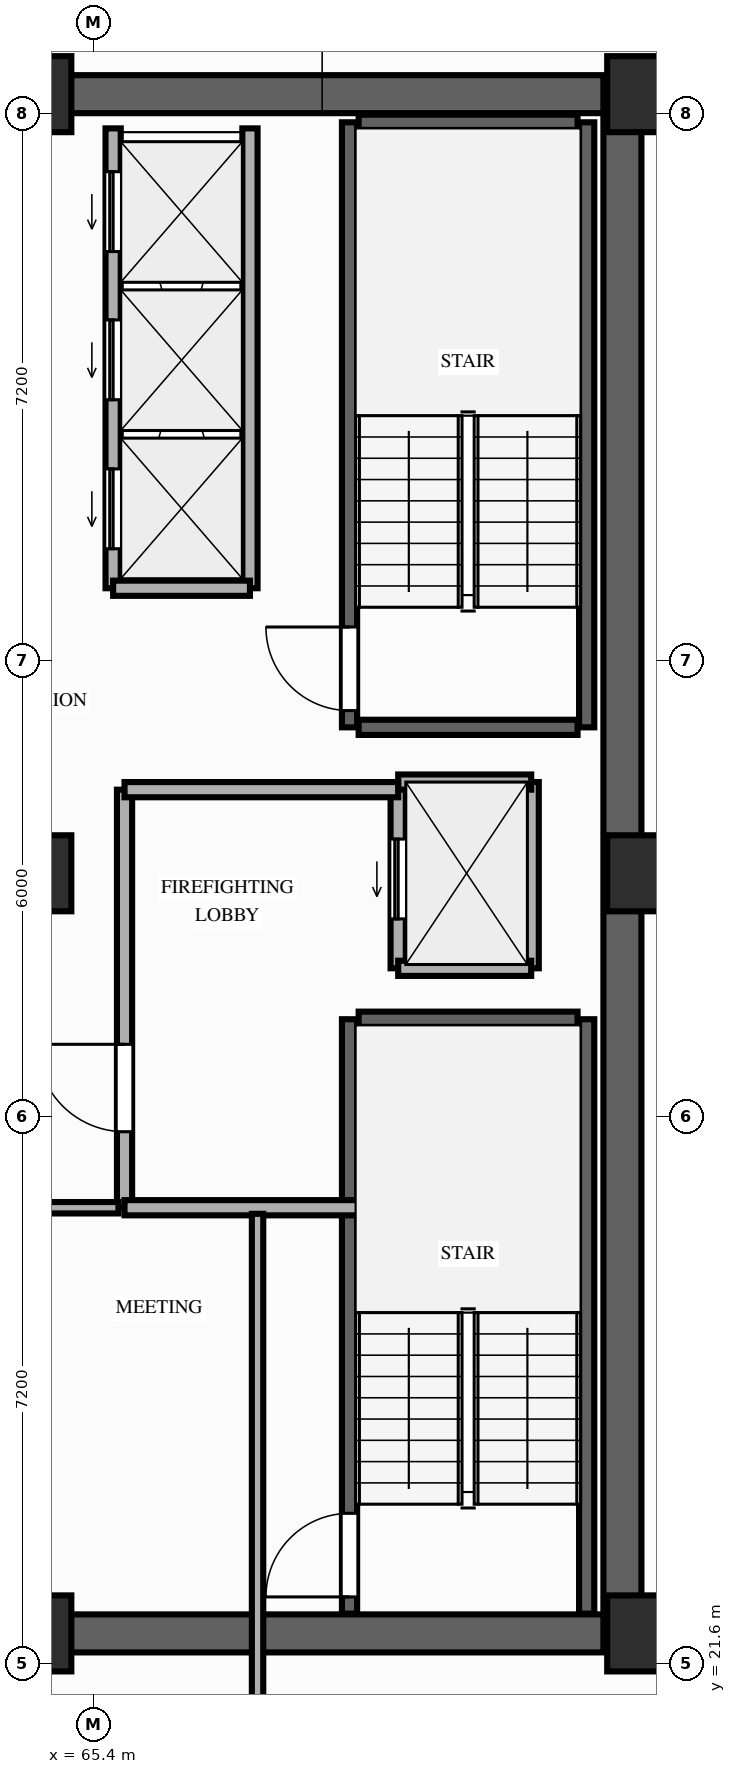
"""IFC4 building model, lengths in metres.
Left out: names, types, materials, properties, quantities, classifications, styles, units other than length and angle.
Written with IfcOpenShell. Run it as: python <this file> out.ifc"""

import sys

from ifc_helpers import new_model, si_unit, direction, frame, frame_2d, origin, origin_2d, place, context, subcontext, project, spatial, rectangle, extrude, element, fill, save


model = new_model("IFC4")
c1 = context("Model", 3, precision=1e-05, world=origin(), true_north=direction((0.0, 1.0)))
c2 = subcontext(c1, "Body", "Model", "MODEL_VIEW")
j1 = project(units=[si_unit("LENGTHUNIT", "METRE"), si_unit("PLANEANGLEUNIT", "RADIAN")], contexts=[c1])
p1 = place(None, origin())
s1 = spatial("IfcSite", under=j1, at=p1, CompositionType="ELEMENT")
p2 = place(p1, origin())
s2 = spatial("IfcBuilding", under=s1, at=p2, CompositionType="ELEMENT")
p3 = place(p2, frame((0.0, 0.0, 50.0)))
s3 = spatial("IfcBuildingStorey", under=s2, at=p3, CompositionType="ELEMENT", Elevation=50.0)
for number, where, z_axis, x_axis in (
    (1, (64.6, 22.0, 0.0), (0.0, 0.0, 1.0), (1.0, 0.0, 0.0)),
    (2, (72.65, 22.0, 0.0), (0.0, 0.0, 1.0), (1.0, 0.0, 0.0)),
    (3, (64.6, 32.0, 0.0), (0.0, 0.0, 1.0), (1.0, 0.0, 0.0)),
    (4, (72.65, 32.0, 0.0), (0.0, 0.0, 1.0), (1.0, 0.0, 0.0)),
    (5, (64.6, 42.25, 0.0), (0.0, 0.0, 1.0), (1.0, 0.0, 0.0)),
    (6, (72.65, 42.25, 0.0), (0.0, 0.0, 1.0), (1.0, 0.0, 0.0)),
):
    element("IfcColumn", number, at=place(p3, frame(where, z_axis=z_axis, x_axis=x_axis)), inside=s3, PredefinedType="COLUMN", context=c2, shape_type="SweptSolid", body=[
        extrude(rectangle(XDim=1.0, YDim=1.0, at=origin_2d()), origin(), (0.0, 0.0, 1.0), 3.2),
    ])
p4 = place(p3, frame((72.35, 22.0, 0.0), z_axis=(0.0, 0.0, 1.0), x_axis=(0.0, 1.0, 0.0)))
e7 = element("IfcWall", 7, at=p4, inside=s3, PredefinedType="SHEAR", context=c2, shape_type="SweptSolid", body=[
    extrude(rectangle(XDim=20.25, YDim=0.5, at=frame_2d((10.125, 0.0))), origin(), (0.0, 0.0, 1.0), 3.02),
])
for number, where, z_axis, x_axis in (
    (8, (64.6, 42.25, 0.0), (0.0, 0.0, 1.0), (1.0, 0.0, 0.0)),
    (9, (64.6, 22.0, 0.0), (0.0, 0.0, 1.0), (1.0, 0.0, 0.0)),
):
    element("IfcWall", number, at=place(p3, frame(where, z_axis=z_axis, x_axis=x_axis)), inside=s3, PredefinedType="SHEAR", context=c2, shape_type="SweptSolid", body=[
        extrude(rectangle(XDim=7.5, YDim=0.5, at=frame_2d((3.75, 0.0))), origin(), (0.0, 0.0, 1.0), 3.02),
    ])
p5 = place(p3, frame((68.76, 22.26, 0.0), z_axis=(0.0, 0.0, 1.0), x_axis=(0.0, 1.0, 0.0)))
e10 = element("IfcWall", 10, at=p5, inside=s3, PredefinedType="SHEAR", context=c2, shape_type="SweptSolid", body=[
    extrude(rectangle(XDim=7.82, YDim=0.2, at=frame_2d((3.91, 0.0))), origin(), (0.0, 0.0, 1.0), 3.02),
])
p6 = place(p5, frame((0.22, 0.0, 0.0)))
e11 = element("IfcOpeningElement", 11, at=p6, cuts=e10, PredefinedType="OPENING", context=c2, shape_type="SweptSolid", body=[
    extrude(rectangle(XDim=1.1, YDim=2.15, at=frame_2d((0.55, 1.075))), frame((0.0, 0.11, 0.0), z_axis=(0.0, -1.0, 0.0), x_axis=(1.0, 0.0, 0.0)), (0.0, 0.0, 1.0), 0.22),
])
p7 = place(p3, frame((71.88, 22.26, 0.0), z_axis=(0.0, 0.0, 1.0), x_axis=(0.0, 1.0, 0.0)))
e12 = element("IfcWall", 12, at=p7, inside=s3, PredefinedType="SHEAR", context=c2, shape_type="SweptSolid", body=[
    extrude(rectangle(XDim=7.82, YDim=0.2, at=frame_2d((3.91, 0.0))), origin(), (0.0, 0.0, 1.0), 3.02),
])
p8 = place(p3, frame((68.88, 30.08, 0.0), z_axis=(0.0, 0.0, 1.0), x_axis=(1.0, 0.0, 0.0)))
e13 = element("IfcWall", 13, at=p8, inside=s3, PredefinedType="SHEAR", context=c2, shape_type="SweptSolid", body=[
    extrude(rectangle(XDim=2.88, YDim=0.2, at=frame_2d((1.44, 0.0))), origin(), (0.0, 0.0, 1.0), 3.02),
])
p9 = place(p3, frame((68.76, 33.92, 0.0), z_axis=(0.0, 0.0, 1.0), x_axis=(0.0, 1.0, 0.0)))
e14 = element("IfcWall", 14, at=p9, inside=s3, PredefinedType="SHEAR", context=c2, shape_type="SweptSolid", body=[
    extrude(rectangle(XDim=7.96, YDim=0.2, at=frame_2d((3.98, 0.0))), origin(), (0.0, 0.0, 1.0), 3.02),
])
p10 = place(p9, frame((0.22, 0.0, 0.0)))
e15 = element("IfcOpeningElement", 15, at=p10, cuts=e14, PredefinedType="OPENING", context=c2, shape_type="SweptSolid", body=[
    extrude(rectangle(XDim=1.1, YDim=2.15, at=frame_2d((0.55, 1.075))), frame((0.0, 0.11, 0.0), z_axis=(0.0, -1.0, 0.0), x_axis=(1.0, 0.0, 0.0)), (0.0, 0.0, 1.0), 0.22),
])
p11 = place(p3, frame((71.88, 33.92, 0.0), z_axis=(0.0, 0.0, 1.0), x_axis=(0.0, 1.0, 0.0)))
e16 = element("IfcWall", 16, at=p11, inside=s3, PredefinedType="SHEAR", context=c2, shape_type="SweptSolid", body=[
    extrude(rectangle(XDim=7.96, YDim=0.2, at=frame_2d((3.98, 0.0))), origin(), (0.0, 0.0, 1.0), 3.02),
])
for number, where, z_axis, x_axis in (
    (17, (68.88, 41.88, 0.0), (0.0, 0.0, 1.0), (1.0, 0.0, 0.0)),
    (18, (68.88, 33.92, 0.0), (0.0, 0.0, 1.0), (1.0, 0.0, 0.0)),
):
    element("IfcWall", number, at=place(p3, frame(where, z_axis=z_axis, x_axis=x_axis)), inside=s3, PredefinedType="SHEAR", context=c2, shape_type="SweptSolid", body=[
        extrude(rectangle(XDim=2.88, YDim=0.2, at=frame_2d((1.44, 0.0))), origin(), (0.0, 0.0, 1.0), 3.02),
    ])
p12 = place(p3, frame((65.65, 35.75, 0.0), z_axis=(0.0, 0.0, 1.0), x_axis=(0.0, 1.0, 0.0)))
e19 = element("IfcWall", 19, at=p12, inside=s3, PredefinedType="MOVABLE", context=c2, shape_type="SweptSolid", body=[
    extrude(rectangle(XDim=6.05, YDim=0.2, at=frame_2d((3.025, 0.0))), origin(), (0.0, 0.0, 1.0), 3.02),
])
p13 = place(p12, frame((0.52, 0.0, 0.0)))
e20 = element("IfcOpeningElement", 20, at=p13, cuts=e19, PredefinedType="OPENING", context=c2, shape_type="SweptSolid", body=[
    extrude(rectangle(XDim=1.05, YDim=2.15, at=frame_2d((0.525, 1.075))), frame((0.0, 0.11, 0.0), z_axis=(0.0, -1.0, 0.0), x_axis=(1.0, 0.0, 0.0)), (0.0, 0.0, 1.0), 0.22),
])
p14 = place(p12, frame((2.48, 0.0, 0.0)))
e21 = element("IfcOpeningElement", 21, at=p14, cuts=e19, PredefinedType="OPENING", context=c2, shape_type="SweptSolid", body=[
    extrude(rectangle(XDim=1.05, YDim=2.15, at=frame_2d((0.525, 1.075))), frame((0.0, 0.11, 0.0), z_axis=(0.0, -1.0, 0.0), x_axis=(1.0, 0.0, 0.0)), (0.0, 0.0, 1.0), 0.22),
])
p15 = place(p12, frame((4.43, 0.0, 0.0)))
e22 = element("IfcOpeningElement", 22, at=p15, cuts=e19, PredefinedType="OPENING", context=c2, shape_type="SweptSolid", body=[
    extrude(rectangle(XDim=1.05, YDim=2.15, at=frame_2d((0.525, 1.075))), frame((0.0, 0.11, 0.0), z_axis=(0.0, -1.0, 0.0), x_axis=(1.0, 0.0, 0.0)), (0.0, 0.0, 1.0), 0.22),
])
p16 = place(p3, frame((67.45, 35.75, 0.0), z_axis=(0.0, 0.0, 1.0), x_axis=(0.0, 1.0, 0.0)))
e23 = element("IfcWall", 23, at=p16, inside=s3, PredefinedType="MOVABLE", context=c2, shape_type="SweptSolid", body=[
    extrude(rectangle(XDim=6.05, YDim=0.2, at=frame_2d((3.025, 0.0))), origin(), (0.0, 0.0, 1.0), 3.02),
])
p17 = place(p3, frame((65.65, 35.75, 0.0), z_axis=(0.0, 0.0, 1.0), x_axis=(1.0, 0.0, 0.0)))
e24 = element("IfcWall", 24, at=p17, inside=s3, PredefinedType="MOVABLE", context=c2, shape_type="SweptSolid", body=[
    extrude(rectangle(XDim=1.8, YDim=0.2, at=frame_2d((0.9, 0.0))), origin(), (0.0, 0.0, 1.0), 3.02),
])
p18 = place(p3, frame((69.4, 30.75, 0.0), z_axis=(0.0, 0.0, 1.0), x_axis=(0.0, 1.0, 0.0)))
e25 = element("IfcWall", 25, at=p18, inside=s3, PredefinedType="MOVABLE", context=c2, shape_type="SweptSolid", body=[
    extrude(rectangle(XDim=2.45, YDim=0.2, at=frame_2d((1.225, 0.0))), origin(), (0.0, 0.0, 1.0), 3.02),
])
p19 = place(p18, frame((0.65, 0.0, 0.0)))
e26 = element("IfcOpeningElement", 26, at=p19, cuts=e25, PredefinedType="OPENING", context=c2, shape_type="SweptSolid", body=[
    extrude(rectangle(XDim=1.05, YDim=2.15, at=frame_2d((0.525, 1.075))), frame((0.0, 0.11, 0.0), z_axis=(0.0, -1.0, 0.0), x_axis=(1.0, 0.0, 0.0)), (0.0, 0.0, 1.0), 0.22),
])
p20 = place(p3, frame((71.15, 30.75, 0.0), z_axis=(0.0, 0.0, 1.0), x_axis=(0.0, 1.0, 0.0)))
e27 = element("IfcWall", 27, at=p20, inside=s3, PredefinedType="MOVABLE", context=c2, shape_type="SweptSolid", body=[
    extrude(rectangle(XDim=2.45, YDim=0.2, at=frame_2d((1.225, 0.0))), origin(), (0.0, 0.0, 1.0), 3.02),
])
for number, where, z_axis, x_axis in (
    (28, (69.4, 33.2, 0.0), (0.0, 0.0, 1.0), (1.0, 0.0, 0.0)),
    (29, (69.4, 30.75, 0.0), (0.0, 0.0, 1.0), (1.0, 0.0, 0.0)),
):
    element("IfcWall", number, at=place(p3, frame(where, z_axis=z_axis, x_axis=x_axis)), inside=s3, PredefinedType="MOVABLE", context=c2, shape_type="SweptSolid", body=[
        extrude(rectangle(XDim=1.75, YDim=0.2, at=frame_2d((0.875, 0.0))), origin(), (0.0, 0.0, 1.0), 3.02),
    ])
p21 = place(p3, frame((65.8, 27.6, 0.0), z_axis=(0.0, 0.0, 1.0), x_axis=(0.0, 1.0, 0.0)))
e30 = element("IfcWall", 30, at=p21, inside=s3, PredefinedType="PARTITIONING", context=c2, shape_type="SweptSolid", body=[
    extrude(rectangle(XDim=5.5, YDim=0.2, at=frame_2d((2.75, 0.0))), origin(), (0.0, 0.0, 1.0), 3.02),
])
p22 = place(p21, frame((1.0, 0.0, 0.0)))
e31 = element("IfcOpeningElement", 31, at=p22, cuts=e30, PredefinedType="OPENING", context=c2, shape_type="SweptSolid", body=[
    extrude(rectangle(XDim=1.15, YDim=2.15, at=frame_2d((0.575, 1.075))), frame((0.0, 0.11, 0.0), z_axis=(0.0, -1.0, 0.0), x_axis=(1.0, 0.0, 0.0)), (0.0, 0.0, 1.0), 0.22),
])
p23 = place(p3, frame((65.8, 33.1, 0.0), z_axis=(0.0, 0.0, 1.0), x_axis=(1.0, 0.0, 0.0)))
e32 = element("IfcWall", 32, at=p23, inside=s3, PredefinedType="PARTITIONING", context=c2, shape_type="SweptSolid", body=[
    extrude(rectangle(XDim=3.6, YDim=0.2, at=frame_2d((1.8, 0.0))), origin(), (0.0, 0.0, 1.0), 3.02),
])
p24 = place(p3, frame((65.8, 27.6, 0.0), z_axis=(0.0, 0.0, 1.0), x_axis=(1.0, 0.0, 0.0)))
e33 = element("IfcWall", 33, at=p24, inside=s3, PredefinedType="PARTITIONING", context=c2, shape_type="SweptSolid", body=[
    extrude(rectangle(XDim=3.4, YDim=0.2, at=frame_2d((1.7, 0.0))), origin(), (0.0, 0.0, 1.0), 3.02),
])
p25 = place(p3, frame((67.55, 21.05, 0.0), z_axis=(0.0, 0.0, 1.0), x_axis=(0.0, 1.0, 0.0)))
e34 = element("IfcWall", 34, at=p25, inside=s3, PredefinedType="PARTITIONING", context=c2, shape_type="SweptSolid", body=[
    extrude(rectangle(XDim=6.47, YDim=0.15, at=frame_2d((3.235, 0.0))), origin(), (0.0, 0.0, 1.0), 2.51),
])
p26 = place(p3, frame((64.25, 27.6, 0.0), z_axis=(0.0, 0.0, 1.0), x_axis=(1.0, 0.0, 0.0)))
e35 = element("IfcWall", 35, at=p26, inside=s3, PredefinedType="PARTITIONING", context=c2, shape_type="SweptSolid", body=[
    extrude(rectangle(XDim=1.47, YDim=0.15, at=frame_2d((0.735, 0.0))), origin(), (0.0, 0.0, 1.0), 2.51),
])
p27 = place(p6, origin())
e36 = element("IfcDoor", 36, at=p27, inside=s3, OperationType="SINGLE_SWING_LEFT", PredefinedType="DOOR", context=c2, shape_type="SweptSolid", body=[
    extrude(rectangle(XDim=1.1, YDim=2.15, at=frame_2d((0.55, 1.075))), frame((0.0, 0.025, 0.0), z_axis=(0.0, -1.0, 0.0), x_axis=(1.0, 0.0, 0.0)), (0.0, 0.0, 1.0), 0.05),
])
fill(e11, e36)
p28 = place(p10, origin())
e37 = element("IfcDoor", 37, at=p28, inside=s3, OperationType="SINGLE_SWING_RIGHT", PredefinedType="DOOR", context=c2, shape_type="SweptSolid", body=[
    extrude(rectangle(XDim=1.1, YDim=2.15, at=frame_2d((0.55, 1.075))), frame((0.0, 0.025, 0.0), z_axis=(0.0, -1.0, 0.0), x_axis=(1.0, 0.0, 0.0)), (0.0, 0.0, 1.0), 0.05),
])
fill(e15, e37)
p29 = place(p13, origin())
e38 = element("IfcDoor", 38, at=p29, inside=s3, OperationType="SLIDING_TO_LEFT", PredefinedType="DOOR", context=c2, shape_type="SweptSolid", body=[
    extrude(rectangle(XDim=1.05, YDim=2.15, at=frame_2d((0.525, 1.075))), frame((0.0, 0.025, 0.0), z_axis=(0.0, -1.0, 0.0), x_axis=(1.0, 0.0, 0.0)), (0.0, 0.0, 1.0), 0.05),
])
fill(e20, e38)
p30 = place(p14, origin())
e39 = element("IfcDoor", 39, at=p30, inside=s3, OperationType="SLIDING_TO_LEFT", PredefinedType="DOOR", context=c2, shape_type="SweptSolid", body=[
    extrude(rectangle(XDim=1.05, YDim=2.15, at=frame_2d((0.525, 1.075))), frame((0.0, 0.025, 0.0), z_axis=(0.0, -1.0, 0.0), x_axis=(1.0, 0.0, 0.0)), (0.0, 0.0, 1.0), 0.05),
])
fill(e21, e39)
p31 = place(p15, origin())
e40 = element("IfcDoor", 40, at=p31, inside=s3, OperationType="SLIDING_TO_LEFT", PredefinedType="DOOR", context=c2, shape_type="SweptSolid", body=[
    extrude(rectangle(XDim=1.05, YDim=2.15, at=frame_2d((0.525, 1.075))), frame((0.0, 0.025, 0.0), z_axis=(0.0, -1.0, 0.0), x_axis=(1.0, 0.0, 0.0)), (0.0, 0.0, 1.0), 0.05),
])
fill(e22, e40)
p32 = place(p19, origin())
e41 = element("IfcDoor", 41, at=p32, inside=s3, OperationType="SLIDING_TO_LEFT", PredefinedType="DOOR", context=c2, shape_type="SweptSolid", body=[
    extrude(rectangle(XDim=1.05, YDim=2.15, at=frame_2d((0.525, 1.075))), frame((0.0, 0.025, 0.0), z_axis=(0.0, -1.0, 0.0), x_axis=(1.0, 0.0, 0.0)), (0.0, 0.0, 1.0), 0.05),
])
fill(e26, e41)
p33 = place(p22, origin())
e42 = element("IfcDoor", 42, at=p33, inside=s3, OperationType="SINGLE_SWING_RIGHT", PredefinedType="DOOR", context=c2, shape_type="SweptSolid", body=[
    extrude(rectangle(XDim=1.15, YDim=2.15, at=frame_2d((0.575, 1.075))), frame((0.0, 0.025, 0.0), z_axis=(0.0, -1.0, 0.0), x_axis=(1.0, 0.0, 0.0)), (0.0, 0.0, 1.0), 0.05),
])
fill(e31, e42)
save(model, sys.argv[1])
